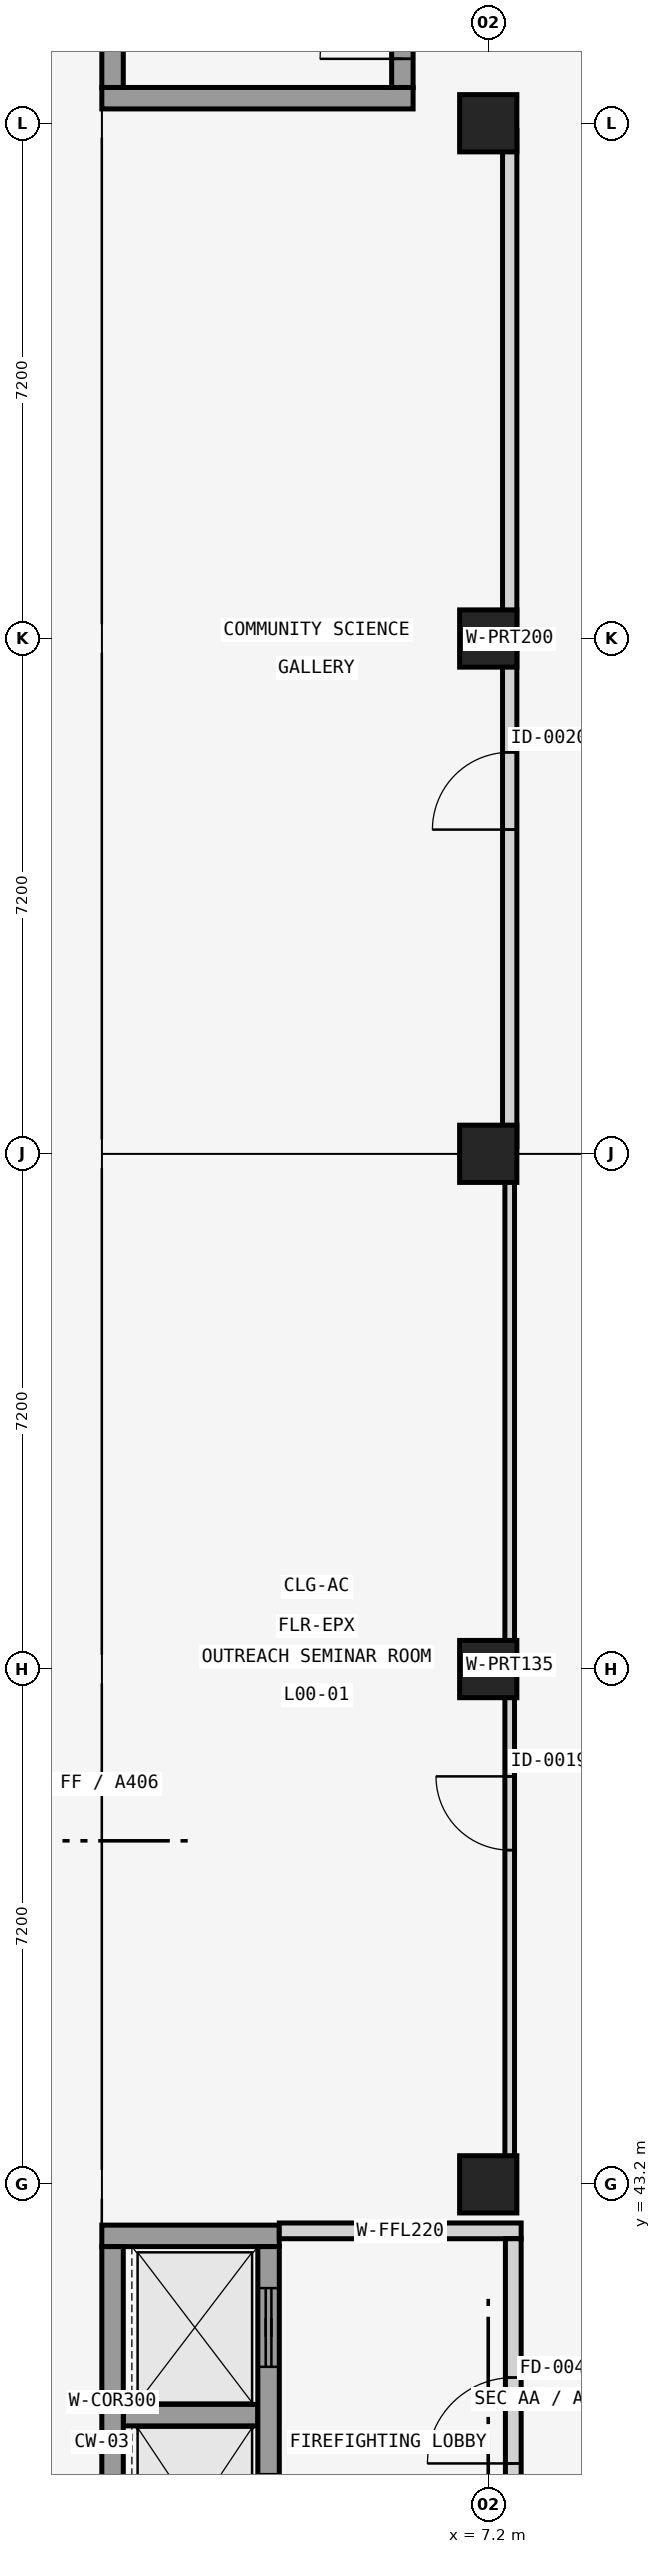
"""IFC4 building model, lengths in metres.
Left out: names, types, materials, properties, quantities, classifications, styles, units other than length and angle.
Written with IfcOpenShell. Run it as: python <this file> out.ifc"""

import sys

from ifc_helpers import new_model, si_unit, direction, frame, frame_2d, origin, origin_2d, place, context, subcontext, project, spatial, rectangle, extrude, element, fill, save


model = new_model("IFC4")
c1 = context("Model", 3, precision=1e-05, world=origin(), true_north=direction((0.0, 1.0)))
c2 = subcontext(c1, "Body", "Model", "MODEL_VIEW")
j1 = project(units=[si_unit("LENGTHUNIT", "METRE"), si_unit("PLANEANGLEUNIT", "RADIAN")], contexts=[c1])
p1 = place(None, origin())
s1 = spatial("IfcSite", under=j1, at=p1, CompositionType="ELEMENT")
p2 = place(p1, origin())
s2 = spatial("IfcBuilding", under=s1, at=p2, CompositionType="ELEMENT")
p3 = place(p2, origin())
s3 = spatial("IfcBuildingStorey", under=s2, at=p3, CompositionType="ELEMENT", Elevation=0.0)
for number, where, z_axis, x_axis in (
    (1, (7.2, 43.2, 0.0), (0.0, 0.0, 1.0), (1.0, 0.0, 0.0)),
    (2, (7.2, 50.4, 0.0), (0.0, 0.0, 1.0), (1.0, 0.0, 0.0)),
    (3, (7.2, 57.6, 0.0), (0.0, 0.0, 1.0), (1.0, 0.0, 0.0)),
    (4, (7.2, 64.8, 0.0), (0.0, 0.0, 1.0), (1.0, 0.0, 0.0)),
    (5, (7.2, 72.0, 0.0), (0.0, 0.0, 1.0), (1.0, 0.0, 0.0)),
):
    element("IfcColumn", number, at=place(p3, frame(where, z_axis=z_axis, x_axis=x_axis)), inside=s3, PredefinedType="COLUMN", context=c2, shape_type="SweptSolid", body=[
        extrude(rectangle(XDim=0.8, YDim=0.8, at=origin_2d()), origin(), (0.0, 0.0, 1.0), 4.8),
    ])
p4 = place(p3, frame((1.8, 42.48, 0.0), z_axis=(0.0, 0.0, 1.0), x_axis=(1.0, 0.0, 0.0)))
e6 = element("IfcWall", 6, at=p4, inside=s3, PredefinedType="SHEAR", context=c2, shape_type="SweptSolid", body=[
    extrude(rectangle(XDim=2.48, YDim=0.3, at=frame_2d((1.24, 0.0))), origin(), (0.0, 0.0, 1.0), 4.45),
])
p5 = place(p3, frame((2.1, 39.975, 0.0), z_axis=(0.0, 0.0, 1.0), x_axis=(1.0, 0.0, 0.0)))
e7 = element("IfcWall", 7, at=p5, inside=s3, PredefinedType="SHEAR", context=c2, shape_type="SweptSolid", body=[
    extrude(rectangle(XDim=1.88, YDim=0.3, at=frame_2d((0.94, 0.0))), origin(), (0.0, 0.0, 1.0), 4.45),
])
p6 = place(p3, frame((1.95, 37.4, 0.0), z_axis=(0.0, 0.0, 1.0), x_axis=(0.0, 1.0, 0.0)))
e8 = element("IfcWall", 8, at=p6, inside=s3, PredefinedType="SHEAR", context=c2, shape_type="SweptSolid", body=[
    extrude(rectangle(XDim=4.93, YDim=0.3, at=frame_2d((2.465, 0.0))), origin(), (0.0, 0.0, 1.0), 4.45),
])
p7 = place(p3, frame((4.13, 37.4, 0.0), z_axis=(0.0, 0.0, 1.0), x_axis=(0.0, 1.0, 0.0)))
e9 = element("IfcWall", 9, at=p7, inside=s3, PredefinedType="SHEAR", context=c2, shape_type="SweptSolid", body=[
    extrude(rectangle(XDim=4.93, YDim=0.3, at=frame_2d((2.465, 0.0))), origin(), (0.0, 0.0, 1.0), 4.45),
])
p8 = place(p7, frame((0.65, 0.0, 0.0)))
e10 = element("IfcOpeningElement", 10, at=p8, cuts=e9, PredefinedType="OPENING", context=c2, shape_type="SweptSolid", body=[
    extrude(rectangle(XDim=1.1, YDim=2.2, at=frame_2d((0.55, 1.1))), frame((0.0, 0.16, 0.0), z_axis=(0.0, -1.0, 0.0), x_axis=(1.0, 0.0, 0.0)), (0.0, 0.0, 1.0), 0.32),
])
p9 = place(p7, frame((3.25, 0.0, 0.0)))
e11 = element("IfcOpeningElement", 11, at=p9, cuts=e9, PredefinedType="OPENING", context=c2, shape_type="SweptSolid", body=[
    extrude(rectangle(XDim=1.1, YDim=2.2, at=frame_2d((0.55, 1.1))), frame((0.0, 0.16, 0.0), z_axis=(0.0, -1.0, 0.0), x_axis=(1.0, 0.0, 0.0)), (0.0, 0.0, 1.0), 0.32),
])
p10 = place(p3, frame((4.28, 42.55, 0.0), z_axis=(0.0, 0.0, 1.0), x_axis=(1.0, 0.0, 0.0)))
e12 = element("IfcWall", 12, at=p10, inside=s3, PredefinedType="SOLIDWALL", context=c2, shape_type="SweptSolid", body=[
    extrude(rectangle(XDim=3.38, YDim=0.22, at=frame_2d((1.69, 0.0))), origin(), (0.0, 0.0, 1.0), 3.45),
])
p11 = place(p3, frame((7.55, 37.36, 0.0), z_axis=(0.0, 0.0, 1.0), x_axis=(0.0, 1.0, 0.0)))
e13 = element("IfcWall", 13, at=p11, inside=s3, PredefinedType="SOLIDWALL", context=c2, shape_type="SweptSolid", body=[
    extrude(rectangle(XDim=5.08, YDim=0.22, at=frame_2d((2.54, 0.0))), origin(), (0.0, 0.0, 1.0), 4.15),
])
p12 = place(p11, frame((1.94, 0.0, 0.0)))
e14 = element("IfcOpeningElement", 14, at=p12, cuts=e13, PredefinedType="OPENING", context=c2, shape_type="SweptSolid", body=[
    extrude(rectangle(XDim=1.2, YDim=2.2, at=frame_2d((0.6, 1.1))), frame((0.0, 0.12, 0.0), z_axis=(0.0, -1.0, 0.0), x_axis=(1.0, 0.0, 0.0)), (0.0, 0.0, 1.0), 0.24),
])
p13 = place(p3, frame((1.8, 72.35, 0.0), z_axis=(0.0, 0.0, 1.0), x_axis=(1.0, 0.0, 0.0)))
e15 = element("IfcWall", 15, at=p13, inside=s3, PredefinedType="SHEAR", context=c2, shape_type="SweptSolid", body=[
    extrude(rectangle(XDim=4.35, YDim=0.3, at=frame_2d((2.175, 0.0))), origin(), (0.0, 0.0, 1.0), 4.45),
])
p14 = place(p3, frame((1.95, 72.5, 0.0), z_axis=(0.0, 0.0, 1.0), x_axis=(0.0, 1.0, 0.0)))
e16 = element("IfcWall", 16, at=p14, inside=s3, PredefinedType="SHEAR", context=c2, shape_type="SweptSolid", body=[
    extrude(rectangle(XDim=7.8, YDim=0.3, at=frame_2d((3.9, 0.0))), origin(), (0.0, 0.0, 1.0), 4.45),
])
p15 = place(p3, frame((6.0, 72.5, 0.0), z_axis=(0.0, 0.0, 1.0), x_axis=(0.0, 1.0, 0.0)))
e17 = element("IfcWall", 17, at=p15, inside=s3, PredefinedType="SHEAR", context=c2, shape_type="SweptSolid", body=[
    extrude(rectangle(XDim=7.8, YDim=0.3, at=frame_2d((3.9, 0.0))), origin(), (0.0, 0.0, 1.0), 4.45),
])
p16 = place(p15, frame((0.4, 0.0, 0.0)))
e18 = element("IfcOpeningElement", 18, at=p16, cuts=e17, PredefinedType="OPENING", context=c2, shape_type="SweptSolid", body=[
    extrude(rectangle(XDim=1.15, YDim=2.2, at=frame_2d((0.575, 1.1))), frame((0.0, 0.16, 0.0), z_axis=(0.0, -1.0, 0.0), x_axis=(1.0, 0.0, 0.0)), (0.0, 0.0, 1.0), 0.32),
])
p17 = place(p3, frame((7.5, 43.567, 0.0), z_axis=(0.0, 0.0, 1.0), x_axis=(0.0, 1.0, 0.0)))
e19 = element("IfcWall", 19, at=p17, inside=s3, PredefinedType="PARTITIONING", context=c2, shape_type="SweptSolid", body=[
    extrude(rectangle(XDim=13.765, YDim=0.135, at=frame_2d((6.883, 0.0))), origin(), (0.0, 0.0, 1.0), 3.85),
])
p18 = place(p17, frame((4.303, 0.0, 0.0)))
e20 = element("IfcOpeningElement", 20, at=p18, cuts=e19, PredefinedType="OPENING", context=c2, shape_type="SweptSolid", body=[
    extrude(rectangle(XDim=1.03, YDim=2.08, at=frame_2d((0.515, 1.04))), frame((0.0, 0.078, 0.0), z_axis=(0.0, -1.0, 0.0), x_axis=(1.0, 0.0, 0.0)), (0.0, 0.0, 1.0), 0.155),
])
p19 = place(p3, frame((7.5, 57.7, 0.0), z_axis=(0.0, 0.0, 1.0), x_axis=(0.0, 1.0, 0.0)))
e21 = element("IfcWall", 21, at=p19, inside=s3, PredefinedType="PARTITIONING", context=c2, shape_type="SweptSolid", body=[
    extrude(rectangle(XDim=14.2, YDim=0.2, at=frame_2d((7.1, 0.0))), origin(), (0.0, 0.0, 1.0), 3.75),
])
p20 = place(p19, frame((4.43, 0.0, 0.0)))
e22 = element("IfcOpeningElement", 22, at=p20, cuts=e21, PredefinedType="OPENING", context=c2, shape_type="SweptSolid", body=[
    extrude(rectangle(XDim=1.08, YDim=2.08, at=frame_2d((0.54, 1.04))), frame((0.0, 0.11, 0.0), z_axis=(0.0, -1.0, 0.0), x_axis=(1.0, 0.0, 0.0)), (0.0, 0.0, 1.0), 0.22),
])
p21 = place(p9, origin())
e23 = element("IfcDoor", 23, at=p21, inside=s3, OperationType="SLIDING_TO_LEFT", PredefinedType="DOOR", context=c2, shape_type="SweptSolid", body=[
    extrude(rectangle(XDim=1.1, YDim=2.2, at=frame_2d((0.55, 1.1))), frame((0.0, 0.025, 0.0), z_axis=(0.0, -1.0, 0.0), x_axis=(1.0, 0.0, 0.0)), (0.0, 0.0, 1.0), 0.05),
])
fill(e11, e23)
p22 = place(p12, origin())
e24 = element("IfcDoor", 24, at=p22, inside=s3, OperationType="SINGLE_SWING_LEFT", PredefinedType="DOOR", context=c2, shape_type="SweptSolid", body=[
    extrude(rectangle(XDim=1.2, YDim=2.2, at=frame_2d((0.6, 1.1))), frame((0.0, 0.025, 0.0), z_axis=(0.0, -1.0, 0.0), x_axis=(1.0, 0.0, 0.0)), (0.0, 0.0, 1.0), 0.05),
])
fill(e14, e24)
p23 = place(p16, origin())
e25 = element("IfcDoor", 25, at=p23, inside=s3, OperationType="SINGLE_SWING_LEFT", PredefinedType="DOOR", context=c2, shape_type="SweptSolid", body=[
    extrude(rectangle(XDim=1.15, YDim=2.2, at=frame_2d((0.575, 1.1))), frame((0.0, 0.025, 0.0), z_axis=(0.0, -1.0, 0.0), x_axis=(1.0, 0.0, 0.0)), (0.0, 0.0, 1.0), 0.05),
])
fill(e18, e25)
p24 = place(p18, origin())
e26 = element("IfcDoor", 26, at=p24, inside=s3, OperationType="SINGLE_SWING_RIGHT", PredefinedType="DOOR", context=c2, shape_type="SweptSolid", body=[
    extrude(rectangle(XDim=1.03, YDim=2.08, at=frame_2d((0.515, 1.04))), frame((0.0, 0.025, 0.0), z_axis=(0.0, -1.0, 0.0), x_axis=(1.0, 0.0, 0.0)), (0.0, 0.0, 1.0), 0.05),
])
fill(e20, e26)
p25 = place(p20, origin())
e27 = element("IfcDoor", 27, at=p25, inside=s3, OperationType="SINGLE_SWING_LEFT", PredefinedType="DOOR", context=c2, shape_type="SweptSolid", body=[
    extrude(rectangle(XDim=1.08, YDim=2.08, at=frame_2d((0.54, 1.04))), frame((0.0, 0.025, 0.0), z_axis=(0.0, -1.0, 0.0), x_axis=(1.0, 0.0, 0.0)), (0.0, 0.0, 1.0), 0.05),
])
fill(e22, e27)
save(model, sys.argv[1])
